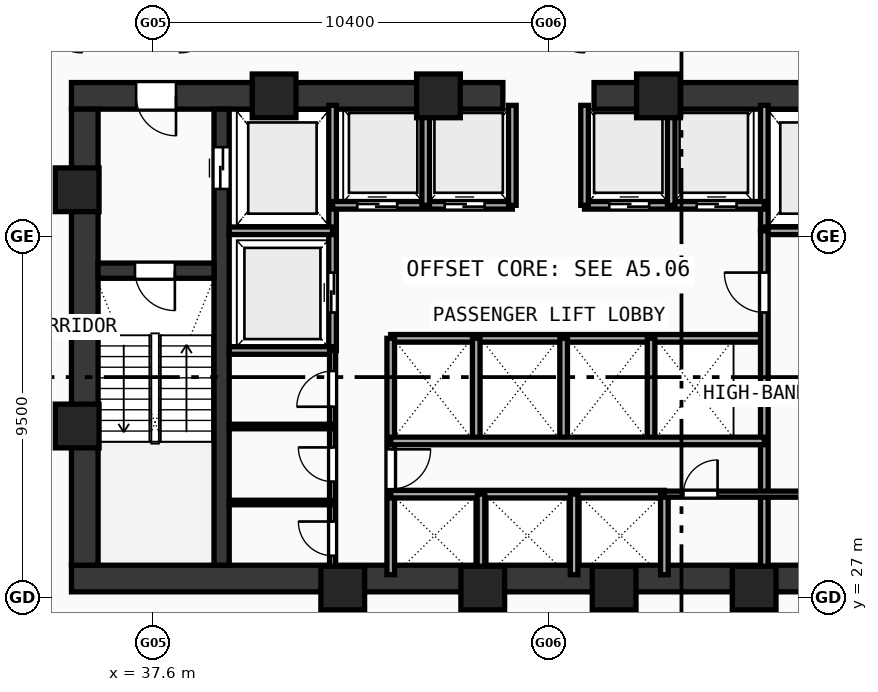
"""IFC4 building model, lengths in metres.
Left out: names, types, materials, properties, quantities, classifications, styles, units other than length and angle.
Written with IfcOpenShell. Run it as: python <this file> out.ifc"""

import sys

from ifc_helpers import new_model, si_unit, direction, frame, frame_2d, origin, origin_with_axes, origin_2d, place, context, subcontext, project, spatial, rectangle, hollow_rectangle, extrude, source, transform, mapped, element, fill, save


model = new_model("IFC4")
c1 = context("Model", 3, precision=1e-05, world=origin(), true_north=direction((0.0, 1.0)))
c2 = subcontext(c1, "Body", "Model", "MODEL_VIEW")
j1 = project(units=[si_unit("LENGTHUNIT", "METRE"), si_unit("PLANEANGLEUNIT", "RADIAN")], contexts=[c1])
p1 = place(None, origin())
s1 = spatial("IfcSite", under=j1, at=p1, CompositionType="ELEMENT")
p2 = place(p1, origin())
s2 = spatial("IfcBuilding", under=s1, at=p2, CompositionType="ELEMENT")
p3 = place(p2, frame((0.0, 0.0, 52.18)))
s3 = spatial("IfcBuildingStorey", under=s2, at=p3, CompositionType="ELEMENT", Elevation=52.18)
p4 = place(p3, frame((35.45, 27.5, 0.0), z_axis=(0.0, 0.0, 1.0), x_axis=(1.0, 0.0, 0.0)))
e1 = element("IfcWall", 1, at=p4, inside=s3, PredefinedType="SHEAR", context=c2, shape_type="SweptSolid", body=[
    extrude(rectangle(XDim=25.1, YDim=0.7, at=frame_2d((12.55, 0.0))), origin(), (0.0, 0.0, 1.0), 3.37),
])
p5 = place(p3, frame((35.45, 40.2, 0.0), z_axis=(0.0, 0.0, 1.0), x_axis=(1.0, 0.0, 0.0)))
e2 = element("IfcWall", 2, at=p5, inside=s3, PredefinedType="SHEAR", context=c2, shape_type="SweptSolid", body=[
    extrude(rectangle(XDim=11.35, YDim=0.7, at=frame_2d((5.675, 0.0))), origin(), (0.0, 0.0, 1.0), 3.37),
])
p6 = place(p5, frame((1.7, 0.0, 0.0)))
e3 = element("IfcOpeningElement", 3, at=p6, cuts=e2, PredefinedType="OPENING", context=c2, shape_type="SweptSolid", body=[
    extrude(rectangle(XDim=1.05, YDim=2.1, at=frame_2d((0.525, 1.05))), frame((0.0, 0.36, 0.0), z_axis=(0.0, -1.0, 0.0), x_axis=(1.0, 0.0, 0.0)), (0.0, 0.0, 1.0), 0.72),
])
p7 = place(p3, frame((49.2, 40.2, 0.0), z_axis=(0.0, 0.0, 1.0), x_axis=(1.0, 0.0, 0.0)))
e4 = element("IfcWall", 4, at=p7, inside=s3, PredefinedType="SHEAR", context=c2, shape_type="SweptSolid", body=[
    extrude(rectangle(XDim=11.35, YDim=0.7, at=frame_2d((5.675, 0.0))), origin(), (0.0, 0.0, 1.0), 3.37),
])
p8 = place(p7, frame((8.6, 0.0, 0.0)))
e5 = element("IfcOpeningElement", 5, at=p8, cuts=e4, PredefinedType="OPENING", context=c2, shape_type="SweptSolid", body=[
    extrude(rectangle(XDim=1.05, YDim=2.1, at=frame_2d((0.525, 1.05))), frame((0.0, 0.36, 0.0), z_axis=(0.0, -1.0, 0.0), x_axis=(1.0, 0.0, 0.0)), (0.0, 0.0, 1.0), 0.72),
])
p9 = place(p3, frame((35.8, 27.85, 0.0), z_axis=(0.0, 0.0, 1.0), x_axis=(0.0, 1.0, 0.0)))
e6 = element("IfcWall", 6, at=p9, inside=s3, PredefinedType="SHEAR", context=c2, shape_type="SweptSolid", body=[
    extrude(rectangle(XDim=12.0, YDim=0.7, at=frame_2d((6.0, 0.0))), origin(), (0.0, 0.0, 1.0), 3.37),
])
p10 = place(p3, frame((39.4, 27.85, 0.0), z_axis=(0.0, 0.0, 1.0), x_axis=(0.0, 1.0, 0.0)))
e7 = element("IfcWall", 7, at=p10, inside=s3, PredefinedType="SHEAR", context=c2, shape_type="SweptSolid", body=[
    extrude(rectangle(XDim=12.0, YDim=0.4, at=frame_2d((6.0, 0.0))), origin(), (0.0, 0.0, 1.0), 3.37),
])
p11 = place(p10, frame((9.9, 0.0, 0.0)))
e8 = element("IfcOpeningElement", 8, at=p11, cuts=e7, PredefinedType="OPENING", context=c2, shape_type="SweptSolid", body=[
    extrude(rectangle(XDim=1.1, YDim=2.1, at=frame_2d((0.55, 1.05))), frame((0.0, 0.21, 0.0), z_axis=(0.0, -1.0, 0.0), x_axis=(1.0, 0.0, 0.0)), (0.0, 0.0, 1.0), 0.42),
])
p12 = place(p3, frame((36.15, 35.6, 0.0), z_axis=(0.0, 0.0, 1.0), x_axis=(1.0, 0.0, 0.0)))
e9 = element("IfcWall", 9, at=p12, inside=s3, PredefinedType="SHEAR", context=c2, shape_type="SweptSolid", body=[
    extrude(rectangle(XDim=3.05, YDim=0.4, at=frame_2d((1.525, 0.0))), origin(), (0.0, 0.0, 1.0), 3.37),
])
p13 = place(p12, frame((0.97, 0.0, 0.0)))
e10 = element("IfcOpeningElement", 10, at=p13, cuts=e9, PredefinedType="OPENING", context=c2, shape_type="SweptSolid", body=[
    extrude(rectangle(XDim=1.05, YDim=2.1, at=frame_2d((0.525, 1.05))), frame((0.0, 0.21, 0.0), z_axis=(0.0, -1.0, 0.0), x_axis=(1.0, 0.0, 0.0)), (0.0, 0.0, 1.0), 0.42),
])
m1 = source(origin(), c2, "Body", "SweptSolid", [
    extrude(hollow_rectangle(XDim=1.15, YDim=1.15, WallThickness=0.048, at=origin_2d()), origin(), (0.0, 0.0, 1.0), 3.63),
])
for number, where, z_axis, x_axis in (
    (11, (42.588, 27.25, -0.26), (0.0, 0.0, 1.0), (1.0, 0.0, 0.0)),
    (12, (46.272, 27.25, -0.26), (0.0, 0.0, 1.0), (1.0, 0.0, 0.0)),
    (13, (49.729, 27.25, -0.26), (0.0, 0.0, 1.0), (1.0, 0.0, 0.0)),
    (14, (53.412, 27.25, -0.26), (0.0, 0.0, 1.0), (1.0, 0.0, 0.0)),
    (15, (50.894, 40.2, -0.26), (0.0, 0.0, 1.0), (1.0, 0.0, 0.0)),
    (16, (45.106, 40.2, -0.26), (0.0, 0.0, 1.0), (1.0, 0.0, 0.0)),
    (17, (40.781, 40.2, -0.26), (0.0, 0.0, 1.0), (1.0, 0.0, 0.0)),
    (18, (35.6, 37.729, -0.26), (0.0, 0.0, 1.0), (1.0, 0.0, 0.0)),
    (19, (35.6, 31.513, -0.26), (0.0, 0.0, 1.0), (1.0, 0.0, 0.0)),
):
    element("IfcColumn", number, at=place(p3, frame(where, z_axis=z_axis, x_axis=x_axis)), inside=s3, PredefinedType="COLUMN", context=c2, shape_type="MappedRepresentation", body=[
        mapped(m1, transform((0.0, 0.0, 0.0), scale=1.0)),
    ])
p14 = place(p3, frame((42.32, 33.5, 0.0), z_axis=(0.0, 0.0, 1.0), x_axis=(0.0, 1.0, 0.0)))
e20 = element("IfcWall", 20, at=p14, inside=s3, PredefinedType="SOLIDWALL", context=c2, shape_type="SweptSolid", body=[
    extrude(rectangle(XDim=6.45, YDim=0.2, at=frame_2d((3.225, 0.0))), origin(), (0.0, 0.0, 1.0), 3.37),
])
p15 = place(p14, frame((1.0, 0.0, 0.0)))
e21 = element("IfcOpeningElement", 21, at=p15, cuts=e20, PredefinedType="OPENING", context=c2, shape_type="SweptSolid", body=[
    extrude(rectangle(XDim=1.05, YDim=2.1, at=frame_2d((0.525, 1.05))), frame((0.0, 0.11, 0.0), z_axis=(0.0, -1.0, 0.0), x_axis=(1.0, 0.0, 0.0)), (0.0, 0.0, 1.0), 0.22),
])
for number, where, z_axis, x_axis in (
    (22, (39.6, 36.65, 0.0), (0.0, 0.0, 1.0), (1.0, 0.0, 0.0)),
    (23, (39.6, 33.5, 0.0), (0.0, 0.0, 1.0), (1.0, 0.0, 0.0)),
):
    element("IfcWall", number, at=place(p3, frame(where, z_axis=z_axis, x_axis=x_axis)), inside=s3, PredefinedType="SOLIDWALL", context=c2, shape_type="SweptSolid", body=[
        extrude(rectangle(XDim=2.72, YDim=0.2, at=frame_2d((1.36, 0.0))), origin(), (0.0, 0.0, 1.0), 3.37),
    ])
p16 = place(p3, frame((53.68, 36.65, 0.0), z_axis=(0.0, 0.0, 1.0), x_axis=(0.0, 1.0, 0.0)))
e24 = element("IfcWall", 24, at=p16, inside=s3, PredefinedType="SOLIDWALL", context=c2, shape_type="SweptSolid", body=[
    extrude(rectangle(XDim=3.3, YDim=0.2, at=frame_2d((1.65, 0.0))), origin(), (0.0, 0.0, 1.0), 3.37),
])
p17 = place(p3, frame((53.68, 36.65, 0.0), z_axis=(0.0, 0.0, 1.0), x_axis=(1.0, 0.0, 0.0)))
e25 = element("IfcWall", 25, at=p17, inside=s3, PredefinedType="SOLIDWALL", context=c2, shape_type="SweptSolid", body=[
    extrude(rectangle(XDim=2.72, YDim=0.2, at=frame_2d((1.36, 0.0))), origin(), (0.0, 0.0, 1.0), 3.37),
])
p18 = place(p3, frame((42.32, 37.32, 0.0), z_axis=(0.0, 0.0, 1.0), x_axis=(1.0, 0.0, 0.0)))
e26 = element("IfcWall", 26, at=p18, inside=s3, PredefinedType="SOLIDWALL", context=c2, shape_type="SweptSolid", body=[
    extrude(rectangle(XDim=4.73, YDim=0.2, at=frame_2d((2.365, 0.0))), origin(), (0.0, 0.0, 1.0), 3.37),
])
p19 = place(p18, frame((0.65, 0.0, 0.0)))
e27 = element("IfcOpeningElement", 27, at=p19, cuts=e26, PredefinedType="OPENING", context=c2, shape_type="SweptSolid", body=[
    extrude(rectangle(XDim=1.05, YDim=2.1, at=frame_2d((0.525, 1.05))), frame((0.0, 0.11, 0.0), z_axis=(0.0, -1.0, 0.0), x_axis=(1.0, 0.0, 0.0)), (0.0, 0.0, 1.0), 0.22),
])
p20 = place(p18, frame((2.95, 0.0, 0.0)))
e28 = element("IfcOpeningElement", 28, at=p20, cuts=e26, PredefinedType="OPENING", context=c2, shape_type="SweptSolid", body=[
    extrude(rectangle(XDim=1.05, YDim=2.1, at=frame_2d((0.525, 1.05))), frame((0.0, 0.11, 0.0), z_axis=(0.0, -1.0, 0.0), x_axis=(1.0, 0.0, 0.0)), (0.0, 0.0, 1.0), 0.22),
])
p21 = place(p3, frame((48.95, 37.32, 0.0), z_axis=(0.0, 0.0, 1.0), x_axis=(1.0, 0.0, 0.0)))
e29 = element("IfcWall", 29, at=p21, inside=s3, PredefinedType="SOLIDWALL", context=c2, shape_type="SweptSolid", body=[
    extrude(rectangle(XDim=4.73, YDim=0.2, at=frame_2d((2.365, 0.0))), origin(), (0.0, 0.0, 1.0), 3.37),
])
p22 = place(p21, frame((0.65, 0.0, 0.0)))
e30 = element("IfcOpeningElement", 30, at=p22, cuts=e29, PredefinedType="OPENING", context=c2, shape_type="SweptSolid", body=[
    extrude(rectangle(XDim=1.05, YDim=2.1, at=frame_2d((0.525, 1.05))), frame((0.0, 0.11, 0.0), z_axis=(0.0, -1.0, 0.0), x_axis=(1.0, 0.0, 0.0)), (0.0, 0.0, 1.0), 0.22),
])
p23 = place(p21, frame((2.95, 0.0, 0.0)))
e31 = element("IfcOpeningElement", 31, at=p23, cuts=e29, PredefinedType="OPENING", context=c2, shape_type="SweptSolid", body=[
    extrude(rectangle(XDim=1.05, YDim=2.1, at=frame_2d((0.525, 1.05))), frame((0.0, 0.11, 0.0), z_axis=(0.0, -1.0, 0.0), x_axis=(1.0, 0.0, 0.0)), (0.0, 0.0, 1.0), 0.22),
])
for number, where, z_axis, x_axis in (
    (32, (47.05, 37.32, 0.0), (0.0, 0.0, 1.0), (0.0, 1.0, 0.0)),
    (33, (48.95, 37.32, 0.0), (0.0, 0.0, 1.0), (0.0, 1.0, 0.0)),
    (34, (44.77, 37.32, 0.0), (0.0, 0.0, 1.0), (0.0, 1.0, 0.0)),
    (35, (51.23, 37.32, 0.0), (0.0, 0.0, 1.0), (0.0, 1.0, 0.0)),
):
    element("IfcWall", number, at=place(p3, frame(where, z_axis=z_axis, x_axis=x_axis)), inside=s3, PredefinedType="SOLIDWALL", context=c2, shape_type="SweptSolid", body=[
        extrude(rectangle(XDim=2.63, YDim=0.2, at=frame_2d((1.315, 0.0))), origin(), (0.0, 0.0, 1.0), 3.37),
    ])
p24 = place(p3, frame((43.85, 33.82, 0.0), z_axis=(0.0, 0.0, 1.0), x_axis=(1.0, 0.0, 0.0)))
e36 = element("IfcWall", 36, at=p24, inside=s3, PredefinedType="SOLIDWALL", context=c2, shape_type="SweptSolid", body=[
    extrude(rectangle(XDim=9.83, YDim=0.2, at=frame_2d((4.915, 0.0))), origin(), (0.0, 0.0, 1.0), 3.37),
])
p25 = place(p3, frame((43.85, 27.6, 0.0), z_axis=(0.0, 0.0, 1.0), x_axis=(0.0, 1.0, 0.0)))
e37 = element("IfcWall", 37, at=p25, inside=s3, PredefinedType="SOLIDWALL", context=c2, shape_type="SweptSolid", body=[
    extrude(rectangle(XDim=6.22, YDim=0.2, at=frame_2d((3.11, 0.0))), origin(), (0.0, 0.0, 1.0), 3.37),
])
p26 = place(p25, frame((2.25, 0.0, 0.0)))
e38 = element("IfcOpeningElement", 38, at=p26, cuts=e37, PredefinedType="OPENING", context=c2, shape_type="SweptSolid", body=[
    extrude(rectangle(XDim=1.05, YDim=2.1, at=frame_2d((0.525, 1.05))), frame((0.0, 0.11, 0.0), z_axis=(0.0, -1.0, 0.0), x_axis=(1.0, 0.0, 0.0)), (0.0, 0.0, 1.0), 0.22),
])
p27 = place(p3, frame((53.68, 27.6, 0.0), z_axis=(0.0, 0.0, 1.0), x_axis=(0.0, 1.0, 0.0)))
e39 = element("IfcWall", 39, at=p27, inside=s3, PredefinedType="SOLIDWALL", context=c2, shape_type="SweptSolid", body=[
    extrude(rectangle(XDim=9.05, YDim=0.2, at=frame_2d((4.525, 0.0))), origin(), (0.0, 0.0, 1.0), 3.37),
])
p28 = place(p27, frame((6.9, 0.0, 0.0)))
e40 = element("IfcOpeningElement", 40, at=p28, cuts=e39, PredefinedType="OPENING", context=c2, shape_type="SweptSolid", body=[
    extrude(rectangle(XDim=1.05, YDim=2.1, at=frame_2d((0.525, 1.05))), frame((0.0, 0.11, 0.0), z_axis=(0.0, -1.0, 0.0), x_axis=(1.0, 0.0, 0.0)), (0.0, 0.0, 1.0), 0.22),
])
for number, where, z_axis, x_axis in (
    (41, (46.1, 31.12, 0.0), (0.0, 0.0, 1.0), (0.0, 1.0, 0.0)),
    (42, (48.4, 31.12, 0.0), (0.0, 0.0, 1.0), (0.0, 1.0, 0.0)),
    (43, (50.7, 31.12, 0.0), (0.0, 0.0, 1.0), (0.0, 1.0, 0.0)),
):
    element("IfcWall", number, at=place(p3, frame(where, z_axis=z_axis, x_axis=x_axis)), inside=s3, PredefinedType="SOLIDWALL", context=c2, shape_type="SweptSolid", body=[
        extrude(rectangle(XDim=2.7, YDim=0.2, at=frame_2d((1.35, 0.0))), origin(), (0.0, 0.0, 1.0), 3.37),
    ])
p29 = place(p3, frame((43.85, 29.72, 0.0), z_axis=(0.0, 0.0, 1.0), x_axis=(1.0, 0.0, 0.0)))
e44 = element("IfcWall", 44, at=p29, inside=s3, PredefinedType="SOLIDWALL", context=c2, shape_type="SweptSolid", body=[
    extrude(rectangle(XDim=7.2, YDim=0.2, at=frame_2d((3.6, 0.0))), origin(), (0.0, 0.0, 1.0), 3.37),
])
p30 = place(p3, frame((51.05, 27.6, 0.0), z_axis=(0.0, 0.0, 1.0), x_axis=(0.0, 1.0, 0.0)))
e45 = element("IfcWall", 45, at=p30, inside=s3, PredefinedType="SOLIDWALL", context=c2, shape_type="SweptSolid", body=[
    extrude(rectangle(XDim=2.12, YDim=0.2, at=frame_2d((1.06, 0.0))), origin(), (0.0, 0.0, 1.0), 3.37),
])
p31 = place(p3, frame((43.85, 31.12, 0.0), z_axis=(0.0, 0.0, 1.0), x_axis=(1.0, 0.0, 0.0)))
e46 = element("IfcWall", 46, at=p31, inside=s3, PredefinedType="SOLIDWALL", context=c2, shape_type="SweptSolid", body=[
    extrude(rectangle(XDim=9.83, YDim=0.2, at=frame_2d((4.915, 0.0))), origin(), (0.0, 0.0, 1.0), 3.37),
])
for number, where, z_axis, x_axis in (
    (47, (46.225, 27.6, 0.0), (0.0, 0.0, 1.0), (0.0, 1.0, 0.0)),
    (48, (48.675, 27.6, 0.0), (0.0, 0.0, 1.0), (0.0, 1.0, 0.0)),
):
    element("IfcWall", number, at=place(p3, frame(where, z_axis=z_axis, x_axis=x_axis)), inside=s3, PredefinedType="SOLIDWALL", context=c2, shape_type="SweptSolid", body=[
        extrude(rectangle(XDim=2.12, YDim=0.2, at=frame_2d((1.06, 0.0))), origin(), (0.0, 0.0, 1.0), 3.37),
    ])
p32 = place(p3, frame((42.32, 27.6, 0.0), z_axis=(0.0, 0.0, 1.0), x_axis=(0.0, 1.0, 0.0)))
e49 = element("IfcWall", 49, at=p32, inside=s3, PredefinedType="PARTITIONING", context=c2, shape_type="SweptSolid", body=[
    extrude(rectangle(XDim=5.9, YDim=0.16, at=frame_2d((2.95, 0.0))), origin(), (0.0, 0.0, 1.0), 3.37),
])
p33 = place(p32, frame((0.5, 0.0, 0.0)))
e50 = element("IfcOpeningElement", 50, at=p33, cuts=e49, PredefinedType="OPENING", context=c2, shape_type="SweptSolid", body=[
    extrude(rectangle(XDim=0.9, YDim=2.1, at=frame_2d((0.45, 1.05))), frame((0.0, 0.09, 0.0), z_axis=(0.0, -1.0, 0.0), x_axis=(1.0, 0.0, 0.0)), (0.0, 0.0, 1.0), 0.18),
])
p34 = place(p32, frame((2.45, 0.0, 0.0)))
e51 = element("IfcOpeningElement", 51, at=p34, cuts=e49, PredefinedType="OPENING", context=c2, shape_type="SweptSolid", body=[
    extrude(rectangle(XDim=0.9, YDim=2.1, at=frame_2d((0.45, 1.05))), frame((0.0, 0.09, 0.0), z_axis=(0.0, -1.0, 0.0), x_axis=(1.0, 0.0, 0.0)), (0.0, 0.0, 1.0), 0.18),
])
p35 = place(p32, frame((4.42, 0.0, 0.0)))
e52 = element("IfcOpeningElement", 52, at=p35, cuts=e49, PredefinedType="OPENING", context=c2, shape_type="SweptSolid", body=[
    extrude(rectangle(XDim=0.94, YDim=2.1, at=frame_2d((0.47, 1.05))), frame((0.0, 0.09, 0.0), z_axis=(0.0, -1.0, 0.0), x_axis=(1.0, 0.0, 0.0)), (0.0, 0.0, 1.0), 0.18),
])
p36 = place(p3, frame((51.05, 29.72, 0.0), z_axis=(0.0, 0.0, 1.0), x_axis=(1.0, 0.0, 0.0)))
e53 = element("IfcWall", 53, at=p36, inside=s3, PredefinedType="PARTITIONING", context=c2, shape_type="SweptSolid", body=[
    extrude(rectangle(XDim=4.07, YDim=0.16, at=frame_2d((2.035, 0.0))), origin(), (0.0, 0.0, 1.0), 3.37),
])
p37 = place(p36, frame((0.5, 0.0, 0.0)))
e54 = element("IfcOpeningElement", 54, at=p37, cuts=e53, PredefinedType="OPENING", context=c2, shape_type="SweptSolid", body=[
    extrude(rectangle(XDim=0.9, YDim=2.1, at=frame_2d((0.45, 1.05))), frame((0.0, 0.09, 0.0), z_axis=(0.0, -1.0, 0.0), x_axis=(1.0, 0.0, 0.0)), (0.0, 0.0, 1.0), 0.18),
])
for number, where, z_axis, x_axis in (
    (55, (39.6, 29.5, 0.0), (0.0, 0.0, 1.0), (1.0, 0.0, 0.0)),
    (56, (39.6, 31.5, 0.0), (0.0, 0.0, 1.0), (1.0, 0.0, 0.0)),
):
    element("IfcWall", number, at=place(p3, frame(where, z_axis=z_axis, x_axis=x_axis)), inside=s3, PredefinedType="PARTITIONING", context=c2, shape_type="SweptSolid", body=[
        extrude(rectangle(XDim=2.72, YDim=0.12, at=frame_2d((1.36, 0.0))), origin(), (0.0, 0.0, 1.0), 3.37),
    ])
m2 = source(origin(), c2, "Body", "SweptSolid", [
    extrude(rectangle(XDim=1.05, YDim=2.1, at=frame_2d((0.525, 1.05))), frame((0.0, 0.025, 0.0), z_axis=(0.0, -1.0, 0.0), x_axis=(1.0, 0.0, 0.0)), (0.0, 0.0, 1.0), 0.05),
])
p38 = place(p13, frame((1.05, 0.0, 0.0), z_axis=(0.0, 0.0, 1.0), x_axis=(-1.0, 0.0, 0.0)))
e57 = element("IfcDoor", 57, at=p38, inside=s3, OperationType="SINGLE_SWING_LEFT", PredefinedType="DOOR", context=c2, shape_type="MappedRepresentation", body=[
    mapped(m2, transform((0.0, 0.0, 0.0), scale=1.0)),
])
fill(e10, e57)
p39 = place(p6, frame((1.05, 0.0, 0.0), z_axis=(0.0, 0.0, 1.0), x_axis=(-1.0, 0.0, 0.0)))
e58 = element("IfcDoor", 58, at=p39, inside=s3, OperationType="SINGLE_SWING_LEFT", PredefinedType="DOOR", context=c2, shape_type="MappedRepresentation", body=[
    mapped(m2, transform((0.0, 0.0, 0.0), scale=1.0)),
])
fill(e3, e58)
m3 = source(origin(), c2, "Body", "SweptSolid", [
    extrude(rectangle(XDim=1.1, YDim=2.1, at=frame_2d((0.55, 1.05))), frame((0.0, 0.025, 0.0), z_axis=(0.0, -1.0, 0.0), x_axis=(1.0, 0.0, 0.0)), (0.0, 0.0, 1.0), 0.05),
])
p40 = place(p11, frame((1.1, 0.0, 0.0), z_axis=(0.0, 0.0, 1.0), x_axis=(-1.0, 0.0, 0.0)))
e59 = element("IfcDoor", 59, at=p40, inside=s3, OperationType="DOUBLE_DOOR_SLIDING", PredefinedType="DOOR", context=c2, shape_type="MappedRepresentation", body=[
    mapped(m3, transform((0.0, 0.0, 0.0), scale=1.0)),
])
fill(e8, e59)
p41 = place(p15, origin_with_axes())
e60 = element("IfcDoor", 60, at=p41, inside=s3, OperationType="DOUBLE_DOOR_SLIDING", PredefinedType="DOOR", context=c2, shape_type="MappedRepresentation", body=[
    mapped(m2, transform((0.0, 0.0, 0.0), scale=1.0)),
])
fill(e21, e60)
p42 = place(p19, frame((1.05, 0.0, 0.0), z_axis=(0.0, 0.0, 1.0), x_axis=(-1.0, 0.0, 0.0)))
e61 = element("IfcDoor", 61, at=p42, inside=s3, OperationType="DOUBLE_DOOR_SLIDING", PredefinedType="DOOR", context=c2, shape_type="MappedRepresentation", body=[
    mapped(m2, transform((0.0, 0.0, 0.0), scale=1.0)),
])
fill(e27, e61)
p43 = place(p20, frame((1.05, 0.0, 0.0), z_axis=(0.0, 0.0, 1.0), x_axis=(-1.0, 0.0, 0.0)))
e62 = element("IfcDoor", 62, at=p43, inside=s3, OperationType="DOUBLE_DOOR_SLIDING", PredefinedType="DOOR", context=c2, shape_type="MappedRepresentation", body=[
    mapped(m2, transform((0.0, 0.0, 0.0), scale=1.0)),
])
fill(e28, e62)
p44 = place(p22, frame((1.05, 0.0, 0.0), z_axis=(0.0, 0.0, 1.0), x_axis=(-1.0, 0.0, 0.0)))
e63 = element("IfcDoor", 63, at=p44, inside=s3, OperationType="DOUBLE_DOOR_SLIDING", PredefinedType="DOOR", context=c2, shape_type="MappedRepresentation", body=[
    mapped(m2, transform((0.0, 0.0, 0.0), scale=1.0)),
])
fill(e30, e63)
p45 = place(p23, frame((1.05, 0.0, 0.0), z_axis=(0.0, 0.0, 1.0), x_axis=(-1.0, 0.0, 0.0)))
e64 = element("IfcDoor", 64, at=p45, inside=s3, OperationType="DOUBLE_DOOR_SLIDING", PredefinedType="DOOR", context=c2, shape_type="MappedRepresentation", body=[
    mapped(m2, transform((0.0, 0.0, 0.0), scale=1.0)),
])
fill(e31, e64)
p46 = place(p26, frame((1.05, 0.0, 0.0), z_axis=(0.0, 0.0, 1.0), x_axis=(-1.0, 0.0, 0.0)))
e65 = element("IfcDoor", 65, at=p46, inside=s3, OperationType="SINGLE_SWING_LEFT", PredefinedType="DOOR", context=c2, shape_type="MappedRepresentation", body=[
    mapped(m2, transform((0.0, 0.0, 0.0), scale=1.0)),
])
fill(e38, e65)
p47 = place(p28, origin_with_axes())
e66 = element("IfcDoor", 66, at=p47, inside=s3, OperationType="SINGLE_SWING_RIGHT", PredefinedType="DOOR", context=c2, shape_type="MappedRepresentation", body=[
    mapped(m2, transform((0.0, 0.0, 0.0), scale=1.0)),
])
fill(e40, e66)
m4 = source(origin(), c2, "Body", "SweptSolid", [
    extrude(rectangle(XDim=0.9, YDim=2.1, at=frame_2d((0.45, 1.05))), frame((0.0, 0.025, 0.0), z_axis=(0.0, -1.0, 0.0), x_axis=(1.0, 0.0, 0.0)), (0.0, 0.0, 1.0), 0.05),
])
p48 = place(p33, origin_with_axes())
e67 = element("IfcDoor", 67, at=p48, inside=s3, OperationType="SINGLE_SWING_RIGHT", PredefinedType="DOOR", context=c2, shape_type="MappedRepresentation", body=[
    mapped(m4, transform((0.0, 0.0, 0.0), scale=1.0)),
])
fill(e50, e67)
p49 = place(p34, origin_with_axes())
e68 = element("IfcDoor", 68, at=p49, inside=s3, OperationType="SINGLE_SWING_RIGHT", PredefinedType="DOOR", context=c2, shape_type="MappedRepresentation", body=[
    mapped(m4, transform((0.0, 0.0, 0.0), scale=1.0)),
])
fill(e51, e68)
m5 = source(origin(), c2, "Body", "SweptSolid", [
    extrude(rectangle(XDim=0.94, YDim=2.1, at=frame_2d((0.47, 1.05))), frame((0.0, 0.025, 0.0), z_axis=(0.0, -1.0, 0.0), x_axis=(1.0, 0.0, 0.0)), (0.0, 0.0, 1.0), 0.05),
])
p50 = place(p35, origin_with_axes())
e69 = element("IfcDoor", 69, at=p50, inside=s3, OperationType="SINGLE_SWING_LEFT", PredefinedType="DOOR", context=c2, shape_type="MappedRepresentation", body=[
    mapped(m5, transform((0.0, 0.0, 0.0), scale=1.0)),
])
fill(e52, e69)
p51 = place(p37, origin_with_axes())
e70 = element("IfcDoor", 70, at=p51, inside=s3, OperationType="SINGLE_SWING_RIGHT", PredefinedType="DOOR", context=c2, shape_type="MappedRepresentation", body=[
    mapped(m4, transform((0.0, 0.0, 0.0), scale=1.0)),
])
fill(e54, e70)
save(model, sys.argv[1])
